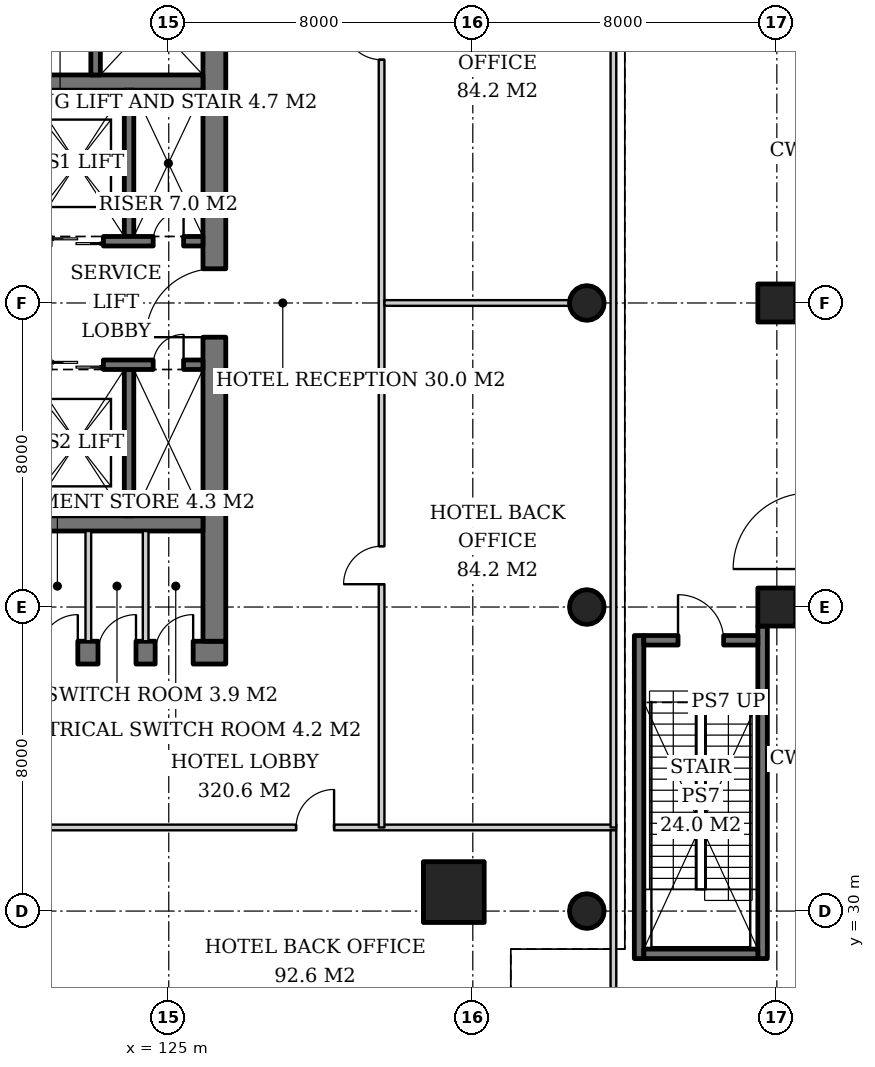
"""IFC4 building model, lengths in metres.
Left out: names, types, materials, properties, quantities, classifications, styles, units other than length and angle.
Written with IfcOpenShell. Run it as: python <this file> out.ifc"""

import sys

from ifc_helpers import new_model, si_unit, direction, frame, frame_2d, origin, origin_2d, place, context, subcontext, project, spatial, rectangle, hollow_circle, extrude, element, fill, save


model = new_model("IFC4")
c1 = context("Model", 3, precision=1e-05, world=origin(), true_north=direction((0.0, 1.0)))
c2 = subcontext(c1, "Body", "Model", "MODEL_VIEW")
j1 = project(units=[si_unit("LENGTHUNIT", "METRE"), si_unit("PLANEANGLEUNIT", "RADIAN")], contexts=[c1])
p1 = place(None, origin())
s1 = spatial("IfcSite", under=j1, at=p1, CompositionType="ELEMENT")
p2 = place(p1, origin())
s2 = spatial("IfcBuilding", under=s1, at=p2, CompositionType="ELEMENT")
p3 = place(p2, origin())
s3 = spatial("IfcBuildingStorey", under=s2, at=p3, CompositionType="ELEMENT", Elevation=0.0)
for number, where, z_axis, x_axis in (
    (1, (141.0, 38.0, 0.0), (0.0, 0.0, 1.0), (1.0, 0.0, 0.0)),
    (2, (141.0, 46.0, 0.0), (0.0, 0.0, 1.0), (1.0, 0.0, 0.0)),
):
    element("IfcColumn", number, at=place(p3, frame(where, z_axis=z_axis, x_axis=x_axis)), inside=s3, PredefinedType="COLUMN", context=c2, shape_type="SweptSolid", body=[
        extrude(rectangle(XDim=1.0, YDim=1.0, at=origin_2d()), origin(), (0.0, 0.0, 1.0), 6.0),
    ])
for number, where, z_axis, x_axis in (
    (3, (136.0, 30.0, 0.0), (0.0, 0.0, 1.0), (1.0, 0.0, 0.0)),
    (4, (136.0, 38.0, 0.0), (0.0, 0.0, 1.0), (1.0, 0.0, 0.0)),
    (5, (136.0, 46.0, 0.0), (0.0, 0.0, 1.0), (1.0, 0.0, 0.0)),
):
    element("IfcColumn", number, at=place(p3, frame(where, z_axis=z_axis, x_axis=x_axis)), inside=s3, PredefinedType="COLUMN", context=c2, shape_type="SweptSolid", body=[
        extrude(hollow_circle(Radius=0.457, WallThickness=0.03, at=origin_2d()), origin(), (0.0, 0.0, 1.0), 6.0),
    ])
p4 = place(p3, frame((132.5, 30.5, 0.0), z_axis=(0.0, 0.0, 1.0), x_axis=(1.0, 0.0, 0.0)))
e6 = element("IfcColumn", 6, at=p4, inside=s3, PredefinedType="COLUMN", context=c2, shape_type="SweptSolid", body=[
    extrude(rectangle(XDim=1.6, YDim=1.6, at=origin_2d()), origin(), (0.0, 0.0, 1.0), 6.0),
])
p5 = place(p3, frame((107.5, 36.8, 0.0), z_axis=(0.0, 0.0, 1.0), x_axis=(1.0, 0.0, 0.0)))
e7 = element("IfcWall", 7, at=p5, inside=s3, PredefinedType="SHEAR", context=c2, shape_type="SweptSolid", body=[
    extrude(rectangle(XDim=19.0, YDim=0.6, at=frame_2d((9.5, 0.0))), origin(), (0.0, 0.0, 1.0), 6.0),
])
p6 = place(p5, frame((3.9, 0.0, 0.0)))
e8 = element("IfcOpeningElement", 8, at=p6, cuts=e7, PredefinedType="OPENING", context=c2, shape_type="SweptSolid", body=[
    extrude(rectangle(XDim=1.0, YDim=2.1, at=frame_2d((0.5, 1.05))), frame((0.0, 0.31, 0.0), z_axis=(0.0, -1.0, 0.0), x_axis=(1.0, 0.0, 0.0)), (0.0, 0.0, 1.0), 0.62),
])
p7 = place(p5, frame((14.107, 0.0, 0.0)))
e9 = element("IfcOpeningElement", 9, at=p7, cuts=e7, PredefinedType="OPENING", context=c2, shape_type="SweptSolid", body=[
    extrude(rectangle(XDim=1.0, YDim=2.1, at=frame_2d((0.5, 1.05))), frame((0.0, 0.31, 0.0), z_axis=(0.0, -1.0, 0.0), x_axis=(1.0, 0.0, 0.0)), (0.0, 0.0, 1.0), 0.62),
])
p8 = place(p5, frame((15.638, 0.0, 0.0)))
e10 = element("IfcOpeningElement", 10, at=p8, cuts=e7, PredefinedType="OPENING", context=c2, shape_type="SweptSolid", body=[
    extrude(rectangle(XDim=1.0, YDim=2.1, at=frame_2d((0.5, 1.05))), frame((0.0, 0.31, 0.0), z_axis=(0.0, -1.0, 0.0), x_axis=(1.0, 0.0, 0.0)), (0.0, 0.0, 1.0), 0.62),
])
p9 = place(p5, frame((17.142, 0.0, 0.0)))
e11 = element("IfcOpeningElement", 11, at=p9, cuts=e7, PredefinedType="OPENING", context=c2, shape_type="SweptSolid", body=[
    extrude(rectangle(XDim=1.0, YDim=2.1, at=frame_2d((0.5, 1.05))), frame((0.0, 0.31, 0.0), z_axis=(0.0, -1.0, 0.0), x_axis=(1.0, 0.0, 0.0)), (0.0, 0.0, 1.0), 0.62),
])
p10 = place(p3, frame((126.2, 37.1, 0.0), z_axis=(0.0, 0.0, 1.0), x_axis=(0.0, 1.0, 0.0)))
e12 = element("IfcWall", 12, at=p10, inside=s3, PredefinedType="SHEAR", context=c2, shape_type="SweptSolid", body=[
    extrude(rectangle(XDim=17.8, YDim=0.6, at=frame_2d((8.9, 0.0))), origin(), (0.0, 0.0, 1.0), 6.0),
])
p11 = place(p10, frame((8.0, 0.0, 0.0)))
e13 = element("IfcOpeningElement", 13, at=p11, cuts=e12, PredefinedType="OPENING", context=c2, shape_type="SweptSolid", body=[
    extrude(rectangle(XDim=1.8, YDim=2.4, at=frame_2d((0.9, 1.2))), frame((0.0, 0.31, 0.0), z_axis=(0.0, -1.0, 0.0), x_axis=(1.0, 0.0, 0.0)), (0.0, 0.0, 1.0), 0.62),
])
for number, where, z_axis, x_axis in (
    (14, (108.1, 40.2, 0.0), (0.0, 0.0, 1.0), (1.0, 0.0, 0.0)),
    (15, (108.1, 51.8, 0.0), (0.0, 0.0, 1.0), (1.0, 0.0, 0.0)),
):
    element("IfcWall", number, at=place(p3, frame(where, z_axis=z_axis, x_axis=x_axis)), inside=s3, PredefinedType="SHEAR", context=c2, shape_type="SweptSolid", body=[
        extrude(rectangle(XDim=17.8, YDim=0.4, at=frame_2d((8.9, 0.0))), origin(), (0.0, 0.0, 1.0), 6.0),
    ])
p12 = place(p3, frame((123.075, 52.0, 0.0), z_axis=(0.0, 0.0, 1.0), x_axis=(0.0, 1.0, 0.0)))
e16 = element("IfcWall", 16, at=p12, inside=s3, PredefinedType="SHEAR", context=c2, shape_type="SweptSolid", body=[
    extrude(rectangle(XDim=2.9, YDim=0.25, at=frame_2d((1.45, 0.0))), origin(), (0.0, 0.0, 1.0), 6.0),
])
p13 = place(p12, frame((0.8, 0.0, 0.0)))
e17 = element("IfcOpeningElement", 17, at=p13, cuts=e16, PredefinedType="OPENING", context=c2, shape_type="SweptSolid", body=[
    extrude(rectangle(XDim=1.3, YDim=2.2, at=frame_2d((0.65, 1.1))), frame((0.0, 0.135, 0.0), z_axis=(0.0, -1.0, 0.0), x_axis=(1.0, 0.0, 0.0)), (0.0, 0.0, 1.0), 0.27),
])
p14 = place(p3, frame((123.955, 47.75, 0.0), z_axis=(0.0, 0.0, 1.0), x_axis=(0.0, 1.0, 0.0)))
e18 = element("IfcWall", 18, at=p14, inside=s3, PredefinedType="SHEAR", context=c2, shape_type="SweptSolid", body=[
    extrude(rectangle(XDim=3.85, YDim=0.25, at=frame_2d((1.925, 0.0))), origin(), (0.0, 0.0, 1.0), 6.0),
])
p15 = place(p3, frame((121.33, 47.625, 0.0), z_axis=(0.0, 0.0, 1.0), x_axis=(1.0, 0.0, 0.0)))
e19 = element("IfcWall", 19, at=p15, inside=s3, PredefinedType="SHEAR", context=c2, shape_type="SweptSolid", body=[
    extrude(rectangle(XDim=4.57, YDim=0.25, at=frame_2d((2.285, 0.0))), origin(), (0.0, 0.0, 1.0), 6.0),
])
p16 = place(p15, frame((0.55, 0.0, 0.0)))
e20 = element("IfcOpeningElement", 20, at=p16, cuts=e19, PredefinedType="OPENING", context=c2, shape_type="SweptSolid", body=[
    extrude(rectangle(XDim=1.4, YDim=2.4, at=frame_2d((0.7, 1.2))), frame((0.0, 0.135, 0.0), z_axis=(0.0, -1.0, 0.0), x_axis=(1.0, 0.0, 0.0)), (0.0, 0.0, 1.0), 0.27),
])
p17 = place(p15, frame((3.26, 0.0, 0.0)))
e21 = element("IfcOpeningElement", 21, at=p17, cuts=e19, PredefinedType="OPENING", context=c2, shape_type="SweptSolid", body=[
    extrude(rectangle(XDim=0.8, YDim=2.0, at=frame_2d((0.4, 1.0))), frame((0.0, 0.135, 0.0), z_axis=(0.0, -1.0, 0.0), x_axis=(1.0, 0.0, 0.0)), (0.0, 0.0, 1.0), 0.27),
])
p18 = place(p3, frame((123.955, 44.25, 0.0), z_axis=(0.0, 0.0, 1.0), x_axis=(0.0, -1.0, 0.0)))
e22 = element("IfcWall", 22, at=p18, inside=s3, PredefinedType="SHEAR", context=c2, shape_type="SweptSolid", body=[
    extrude(rectangle(XDim=3.85, YDim=0.25, at=frame_2d((1.925, 0.0))), origin(), (0.0, 0.0, 1.0), 6.0),
])
p19 = place(p3, frame((121.33, 44.375, 0.0), z_axis=(0.0, 0.0, 1.0), x_axis=(1.0, 0.0, 0.0)))
e23 = element("IfcWall", 23, at=p19, inside=s3, PredefinedType="SHEAR", context=c2, shape_type="SweptSolid", body=[
    extrude(rectangle(XDim=4.57, YDim=0.25, at=frame_2d((2.285, 0.0))), origin(), (0.0, 0.0, 1.0), 6.0),
])
p20 = place(p19, frame((0.55, 0.0, 0.0)))
e24 = element("IfcOpeningElement", 24, at=p20, cuts=e23, PredefinedType="OPENING", context=c2, shape_type="SweptSolid", body=[
    extrude(rectangle(XDim=1.4, YDim=2.4, at=frame_2d((0.7, 1.2))), frame((0.0, 0.135, 0.0), z_axis=(0.0, -1.0, 0.0), x_axis=(1.0, 0.0, 0.0)), (0.0, 0.0, 1.0), 0.27),
])
p21 = place(p19, frame((3.26, 0.0, 0.0)))
e25 = element("IfcOpeningElement", 25, at=p21, cuts=e23, PredefinedType="OPENING", context=c2, shape_type="SweptSolid", body=[
    extrude(rectangle(XDim=0.8, YDim=2.0, at=frame_2d((0.4, 1.0))), frame((0.0, 0.135, 0.0), z_axis=(0.0, -1.0, 0.0), x_axis=(1.0, 0.0, 0.0)), (0.0, 0.0, 1.0), 0.27),
])
for number, where, z_axis, x_axis in (
    (26, (122.884, 37.1, 0.0), (0.0, 0.0, 1.0), (0.0, 1.0, 0.0)),
    (27, (124.392, 37.1, 0.0), (0.0, 0.0, 1.0), (0.0, 1.0, 0.0)),
):
    element("IfcWall", number, at=place(p3, frame(where, z_axis=z_axis, x_axis=x_axis)), inside=s3, PredefinedType="SOLIDWALL", context=c2, shape_type="SweptSolid", body=[
        extrude(rectangle(XDim=2.9, YDim=0.15, at=frame_2d((1.45, 0.0))), origin(), (0.0, 0.0, 1.0), 5.7),
    ])
p22 = place(p3, frame((137.375, 28.75, 0.0), z_axis=(0.0, 0.0, 1.0), x_axis=(0.0, 1.0, 0.0)))
e28 = element("IfcWall", 28, at=p22, inside=s3, PredefinedType="SOLIDWALL", context=c2, shape_type="SweptSolid", body=[
    extrude(rectangle(XDim=8.5, YDim=0.25, at=frame_2d((4.25, 0.0))), origin(), (0.0, 0.0, 1.0), 5.7),
])
p23 = place(p3, frame((140.625, 28.75, 0.0), z_axis=(0.0, 0.0, 1.0), x_axis=(0.0, 1.0, 0.0)))
e29 = element("IfcWall", 29, at=p23, inside=s3, PredefinedType="SOLIDWALL", context=c2, shape_type="SweptSolid", body=[
    extrude(rectangle(XDim=8.75, YDim=0.25, at=frame_2d((4.375, 0.0))), origin(), (0.0, 0.0, 1.0), 5.7),
])
p24 = place(p3, frame((137.5, 28.875, 0.0), z_axis=(0.0, 0.0, 1.0), x_axis=(1.0, 0.0, 0.0)))
e30 = element("IfcWall", 30, at=p24, inside=s3, PredefinedType="SOLIDWALL", context=c2, shape_type="SweptSolid", body=[
    extrude(rectangle(XDim=3.0, YDim=0.25, at=frame_2d((1.5, 0.0))), origin(), (0.0, 0.0, 1.0), 5.7),
])
p25 = place(p3, frame((137.5, 37.125, 0.0), z_axis=(0.0, 0.0, 1.0), x_axis=(1.0, 0.0, 0.0)))
e31 = element("IfcWall", 31, at=p25, inside=s3, PredefinedType="SOLIDWALL", context=c2, shape_type="SweptSolid", body=[
    extrude(rectangle(XDim=3.0, YDim=0.25, at=frame_2d((1.5, 0.0))), origin(), (0.0, 0.0, 1.0), 5.7),
])
p26 = place(p25, frame((0.9, 0.0, 0.0)))
e32 = element("IfcOpeningElement", 32, at=p26, cuts=e31, PredefinedType="OPENING", context=c2, shape_type="SweptSolid", body=[
    extrude(rectangle(XDim=1.2, YDim=2.1, at=frame_2d((0.6, 1.05))), frame((0.0, 0.135, 0.0), z_axis=(0.0, -1.0, 0.0), x_axis=(1.0, 0.0, 0.0)), (0.0, 0.0, 1.0), 0.27),
])
p27 = place(p3, frame((113.075, 32.2, 0.0), z_axis=(0.0, 0.0, 1.0), x_axis=(1.0, 0.0, 0.0)))
e33 = element("IfcWall", 33, at=p27, inside=s3, PredefinedType="PARTITIONING", context=c2, shape_type="SweptSolid", body=[
    extrude(rectangle(XDim=23.7, YDim=0.15, at=frame_2d((11.85, 0.0))), origin(), (0.0, 0.0, 1.0), 4.947),
])
p28 = place(p27, frame((3.425, 0.0, 0.0)))
e34 = element("IfcOpeningElement", 34, at=p28, cuts=e33, PredefinedType="OPENING", context=c2, shape_type="SweptSolid", body=[
    extrude(rectangle(XDim=1.0, YDim=2.1, at=frame_2d((0.5, 1.05))), frame((0.0, 0.085, 0.0), z_axis=(0.0, -1.0, 0.0), x_axis=(1.0, 0.0, 0.0)), (0.0, 0.0, 1.0), 0.17),
])
p29 = place(p27, frame((15.275, 0.0, 0.0)))
e35 = element("IfcOpeningElement", 35, at=p29, cuts=e33, PredefinedType="OPENING", context=c2, shape_type="SweptSolid", body=[
    extrude(rectangle(XDim=1.0, YDim=2.1, at=frame_2d((0.5, 1.05))), frame((0.0, 0.085, 0.0), z_axis=(0.0, -1.0, 0.0), x_axis=(1.0, 0.0, 0.0)), (0.0, 0.0, 1.0), 0.17),
])
p30 = place(p3, frame((136.7, 26.375, 0.0), z_axis=(0.0, 0.0, 1.0), x_axis=(0.0, 1.0, 0.0)))
e36 = element("IfcWall", 36, at=p30, inside=s3, PredefinedType="PARTITIONING", context=c2, shape_type="SweptSolid", body=[
    extrude(rectangle(XDim=5.75, YDim=0.15, at=frame_2d((2.875, 0.0))), origin(), (0.0, 0.0, 1.0), 5.7),
])
p31 = place(p3, frame((130.6, 32.2, 0.0), z_axis=(0.0, 0.0, 1.0), x_axis=(0.0, 1.0, 0.0)))
e37 = element("IfcWall", 37, at=p31, inside=s3, PredefinedType="PARTITIONING", context=c2, shape_type="SweptSolid", body=[
    extrude(rectangle(XDim=27.6, YDim=0.15, at=frame_2d((13.8, 0.0))), origin(), (0.0, 0.0, 1.0), 4.9),
])
p32 = place(p31, frame((6.4, 0.0, 0.0)))
e38 = element("IfcOpeningElement", 38, at=p32, cuts=e37, PredefinedType="OPENING", context=c2, shape_type="SweptSolid", body=[
    extrude(rectangle(XDim=1.0, YDim=2.1, at=frame_2d((0.5, 1.05))), frame((0.0, 0.085, 0.0), z_axis=(0.0, -1.0, 0.0), x_axis=(1.0, 0.0, 0.0)), (0.0, 0.0, 1.0), 0.17),
])
p33 = place(p31, frame((20.2, 0.0, 0.0)))
e39 = element("IfcOpeningElement", 39, at=p33, cuts=e37, PredefinedType="OPENING", context=c2, shape_type="SweptSolid", body=[
    extrude(rectangle(XDim=1.0, YDim=2.1, at=frame_2d((0.5, 1.05))), frame((0.0, 0.085, 0.0), z_axis=(0.0, -1.0, 0.0), x_axis=(1.0, 0.0, 0.0)), (0.0, 0.0, 1.0), 0.17),
])
p34 = place(p3, frame((136.7, 32.2, 0.0), z_axis=(0.0, 0.0, 1.0), x_axis=(0.0, 1.0, 0.0)))
e40 = element("IfcWall", 40, at=p34, inside=s3, PredefinedType="PARTITIONING", context=c2, shape_type="SweptSolid", body=[
    extrude(rectangle(XDim=27.6, YDim=0.15, at=frame_2d((13.8, 0.0))), origin(), (0.0, 0.0, 1.0), 5.7),
])
p35 = place(p3, frame((130.675, 46.0, 0.0), z_axis=(0.0, 0.0, 1.0), x_axis=(1.0, 0.0, 0.0)))
e41 = element("IfcWall", 41, at=p35, inside=s3, PredefinedType="PARTITIONING", context=c2, shape_type="SweptSolid", body=[
    extrude(rectangle(XDim=4.868, YDim=0.15, at=frame_2d((2.434, 0.0))), origin(), (0.0, 0.0, 1.0), 5.7),
])
p36 = place(p16, origin())
e42 = element("IfcDoor", 42, at=p36, inside=s3, OperationType="DOUBLE_DOOR_SLIDING", PredefinedType="DOOR", context=c2, shape_type="SweptSolid", body=[
    extrude(rectangle(XDim=1.4, YDim=2.4, at=frame_2d((0.7, 1.2))), frame((0.0, 0.025, 0.0), z_axis=(0.0, -1.0, 0.0), x_axis=(1.0, 0.0, 0.0)), (0.0, 0.0, 1.0), 0.05),
])
fill(e20, e42)
p37 = place(p17, origin())
e43 = element("IfcDoor", 43, at=p37, inside=s3, OperationType="SINGLE_SWING_RIGHT", PredefinedType="DOOR", context=c2, shape_type="SweptSolid", body=[
    extrude(rectangle(XDim=0.8, YDim=2.0, at=frame_2d((0.4, 1.0))), frame((0.0, 0.025, 0.0), z_axis=(0.0, -1.0, 0.0), x_axis=(1.0, 0.0, 0.0)), (0.0, 0.0, 1.0), 0.05),
])
fill(e21, e43)
p38 = place(p20, origin())
e44 = element("IfcDoor", 44, at=p38, inside=s3, OperationType="DOUBLE_DOOR_SLIDING", PredefinedType="DOOR", context=c2, shape_type="SweptSolid", body=[
    extrude(rectangle(XDim=1.4, YDim=2.4, at=frame_2d((0.7, 1.2))), frame((0.0, 0.025, 0.0), z_axis=(0.0, -1.0, 0.0), x_axis=(1.0, 0.0, 0.0)), (0.0, 0.0, 1.0), 0.05),
])
fill(e24, e44)
p39 = place(p21, origin())
e45 = element("IfcDoor", 45, at=p39, inside=s3, OperationType="SINGLE_SWING_RIGHT", PredefinedType="DOOR", context=c2, shape_type="SweptSolid", body=[
    extrude(rectangle(XDim=0.8, YDim=2.0, at=frame_2d((0.4, 1.0))), frame((0.0, 0.025, 0.0), z_axis=(0.0, -1.0, 0.0), x_axis=(1.0, 0.0, 0.0)), (0.0, 0.0, 1.0), 0.05),
])
fill(e25, e45)
p40 = place(p11, origin())
e46 = element("IfcDoor", 46, at=p40, inside=s3, OperationType="DOUBLE_DOOR_SINGLE_SWING", PredefinedType="DOOR", context=c2, shape_type="SweptSolid", body=[
    extrude(rectangle(XDim=1.8, YDim=2.4, at=frame_2d((0.9, 1.2))), frame((0.0, 0.025, 0.0), z_axis=(0.0, -1.0, 0.0), x_axis=(1.0, 0.0, 0.0)), (0.0, 0.0, 1.0), 0.05),
])
fill(e13, e46)
p41 = place(p7, origin())
e47 = element("IfcDoor", 47, at=p41, inside=s3, OperationType="SINGLE_SWING_RIGHT", PredefinedType="DOOR", context=c2, shape_type="SweptSolid", body=[
    extrude(rectangle(XDim=1.0, YDim=2.1, at=frame_2d((0.5, 1.05))), frame((0.0, 0.29, 0.0), z_axis=(0.0, -1.0, 0.0), x_axis=(1.0, 0.0, 0.0)), (0.0, 0.0, 1.0), 0.05),
])
fill(e9, e47)
p42 = place(p8, origin())
e48 = element("IfcDoor", 48, at=p42, inside=s3, OperationType="SINGLE_SWING_RIGHT", PredefinedType="DOOR", context=c2, shape_type="SweptSolid", body=[
    extrude(rectangle(XDim=1.0, YDim=2.1, at=frame_2d((0.5, 1.05))), frame((0.0, 0.29, 0.0), z_axis=(0.0, -1.0, 0.0), x_axis=(1.0, 0.0, 0.0)), (0.0, 0.0, 1.0), 0.05),
])
fill(e10, e48)
p43 = place(p9, origin())
e49 = element("IfcDoor", 49, at=p43, inside=s3, OperationType="SINGLE_SWING_RIGHT", PredefinedType="DOOR", context=c2, shape_type="SweptSolid", body=[
    extrude(rectangle(XDim=1.0, YDim=2.1, at=frame_2d((0.5, 1.05))), frame((0.0, 0.29, 0.0), z_axis=(0.0, -1.0, 0.0), x_axis=(1.0, 0.0, 0.0)), (0.0, 0.0, 1.0), 0.05),
])
fill(e11, e49)
p44 = place(p26, origin())
e50 = element("IfcDoor", 50, at=p44, inside=s3, OperationType="SINGLE_SWING_LEFT", PredefinedType="DOOR", context=c2, shape_type="SweptSolid", body=[
    extrude(rectangle(XDim=1.2, YDim=2.1, at=frame_2d((0.6, 1.05))), frame((0.0, 0.025, 0.0), z_axis=(0.0, -1.0, 0.0), x_axis=(1.0, 0.0, 0.0)), (0.0, 0.0, 1.0), 0.05),
])
fill(e32, e50)
p45 = place(p29, origin())
e51 = element("IfcDoor", 51, at=p45, inside=s3, OperationType="SINGLE_SWING_RIGHT", PredefinedType="DOOR", context=c2, shape_type="SweptSolid", body=[
    extrude(rectangle(XDim=1.0, YDim=2.1, at=frame_2d((0.5, 1.05))), frame((0.0, 0.025, 0.0), z_axis=(0.0, -1.0, 0.0), x_axis=(1.0, 0.0, 0.0)), (0.0, 0.0, 1.0), 0.05),
])
fill(e35, e51)
p46 = place(p32, origin())
e52 = element("IfcDoor", 52, at=p46, inside=s3, OperationType="SINGLE_SWING_LEFT", PredefinedType="DOOR", context=c2, shape_type="SweptSolid", body=[
    extrude(rectangle(XDim=1.0, YDim=2.1, at=frame_2d((0.5, 1.05))), frame((0.0, 0.025, 0.0), z_axis=(0.0, -1.0, 0.0), x_axis=(1.0, 0.0, 0.0)), (0.0, 0.0, 1.0), 0.05),
])
fill(e38, e52)
p47 = place(p33, origin())
e53 = element("IfcDoor", 53, at=p47, inside=s3, OperationType="SINGLE_SWING_RIGHT", PredefinedType="DOOR", context=c2, shape_type="SweptSolid", body=[
    extrude(rectangle(XDim=1.0, YDim=2.1, at=frame_2d((0.5, 1.05))), frame((0.0, 0.025, 0.0), z_axis=(0.0, -1.0, 0.0), x_axis=(1.0, 0.0, 0.0)), (0.0, 0.0, 1.0), 0.05),
])
fill(e39, e53)
save(model, sys.argv[1])
